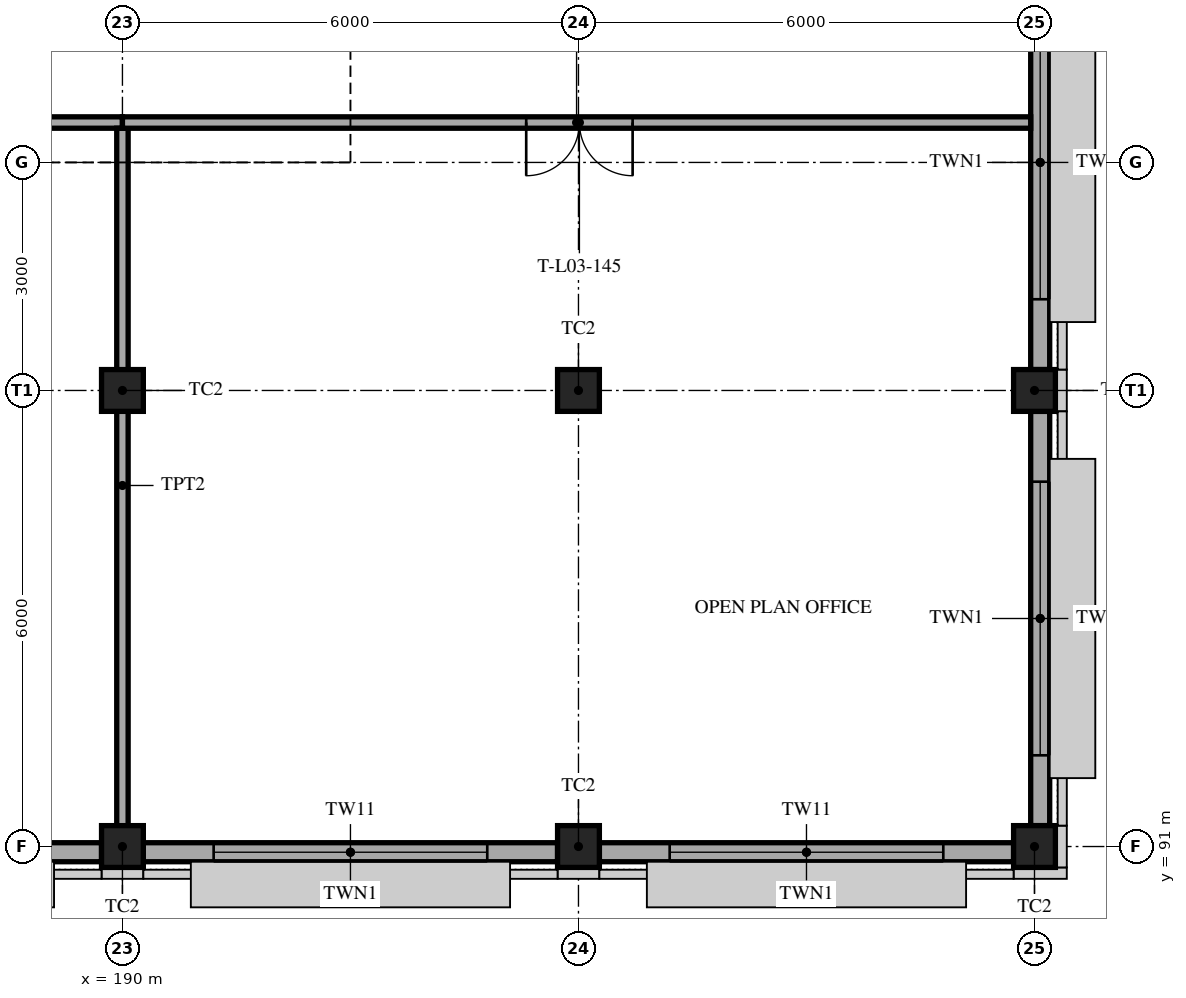
"""IFC4 building model, lengths in metres.
Left out: names, types, materials, properties, quantities, classifications, styles, units other than length and angle.
Written with IfcOpenShell. Run it as: python <this file> out.ifc"""

import sys

from ifc_helpers import new_model, si_unit, direction, frame, frame_2d, origin, origin_2d, place, context, subcontext, project, spatial, polyline, rectangle, hollow_rectangle, outline, extrude, element, fill, save


model = new_model("IFC4")
c1 = context("Model", 3, precision=1e-05, world=origin(), true_north=direction((0.0, 1.0)))
c2 = subcontext(c1, "Body", "Model", "MODEL_VIEW")
j1 = project(units=[si_unit("LENGTHUNIT", "METRE"), si_unit("PLANEANGLEUNIT", "RADIAN")], contexts=[c1])
p1 = place(None, origin())
s1 = spatial("IfcSite", under=j1, at=p1, CompositionType="ELEMENT")
p2 = place(p1, origin())
s2 = spatial("IfcBuilding", under=s1, at=p2, CompositionType="ELEMENT")
p3 = place(p2, frame((0.0, 0.0, 15.0)))
s3 = spatial("IfcBuildingStorey", under=s2, at=p3, CompositionType="ELEMENT", Elevation=15.0)
for number, where, z_axis, x_axis in (
    (1, (190.0, 91.0, 0.0), (0.0, 0.0, 1.0), (1.0, 0.0, 0.0)),
    (2, (196.0, 91.0, 0.0), (0.0, 0.0, 1.0), (1.0, 0.0, 0.0)),
    (3, (202.0, 91.0, 0.0), (0.0, 0.0, 1.0), (1.0, 0.0, 0.0)),
    (4, (202.0, 97.0, 0.0), (0.0, 0.0, 1.0), (1.0, 0.0, 0.0)),
    (5, (190.0, 97.0, 0.0), (0.0, 0.0, 1.0), (1.0, 0.0, 0.0)),
    (6, (196.0, 97.0, 0.0), (0.0, 0.0, 1.0), (1.0, 0.0, 0.0)),
):
    element("IfcColumn", number, at=place(p3, frame(where, z_axis=z_axis, x_axis=x_axis)), inside=s3, PredefinedType="COLUMN", context=c2, shape_type="SweptSolid", body=[
        extrude(hollow_rectangle(XDim=0.55, YDim=0.55, WallThickness=0.032, at=origin_2d()), origin(), (0.0, 0.0, 1.0), 4.2),
    ])
p4 = place(p3, frame((184.275, 90.925, 0.0), z_axis=(0.0, 0.0, 1.0), x_axis=(1.0, 0.0, 0.0)))
e7 = element("IfcWall", 7, at=p4, inside=s3, PredefinedType="SOLIDWALL", context=c2, shape_type="SweptSolid", body=[
    extrude(rectangle(XDim=5.45, YDim=0.25, at=frame_2d((2.725, 0.0))), origin(), (0.0, 0.0, 1.0), 3.55),
])
p5 = place(p4, frame((0.925, 0.0, 0.9)))
e8 = element("IfcOpeningElement", 8, at=p5, cuts=e7, PredefinedType="OPENING", context=c2, shape_type="SweptSolid", body=[
    extrude(rectangle(XDim=3.6, YDim=2.4, at=frame_2d((1.8, 1.2))), frame((0.0, 0.135, 0.0), z_axis=(0.0, -1.0, 0.0), x_axis=(1.0, 0.0, 0.0)), (0.0, 0.0, 1.0), 0.27),
])
p6 = place(p3, frame((190.275, 90.925, 0.0), z_axis=(0.0, 0.0, 1.0), x_axis=(1.0, 0.0, 0.0)))
e9 = element("IfcWall", 9, at=p6, inside=s3, PredefinedType="SOLIDWALL", context=c2, shape_type="SweptSolid", body=[
    extrude(rectangle(XDim=5.45, YDim=0.25, at=frame_2d((2.725, 0.0))), origin(), (0.0, 0.0, 1.0), 3.55),
])
p7 = place(p6, frame((0.925, 0.0, 0.9)))
e10 = element("IfcOpeningElement", 10, at=p7, cuts=e9, PredefinedType="OPENING", context=c2, shape_type="SweptSolid", body=[
    extrude(rectangle(XDim=3.6, YDim=2.4, at=frame_2d((1.8, 1.2))), frame((0.0, 0.135, 0.0), z_axis=(0.0, -1.0, 0.0), x_axis=(1.0, 0.0, 0.0)), (0.0, 0.0, 1.0), 0.27),
])
p8 = place(p3, frame((196.275, 90.925, 0.0), z_axis=(0.0, 0.0, 1.0), x_axis=(1.0, 0.0, 0.0)))
e11 = element("IfcWall", 11, at=p8, inside=s3, PredefinedType="SOLIDWALL", context=c2, shape_type="SweptSolid", body=[
    extrude(rectangle(XDim=5.45, YDim=0.25, at=frame_2d((2.725, 0.0))), origin(), (0.0, 0.0, 1.0), 3.55),
])
p9 = place(p8, frame((0.925, 0.0, 0.9)))
e12 = element("IfcOpeningElement", 12, at=p9, cuts=e11, PredefinedType="OPENING", context=c2, shape_type="SweptSolid", body=[
    extrude(rectangle(XDim=3.6, YDim=2.4, at=frame_2d((1.8, 1.2))), frame((0.0, 0.135, 0.0), z_axis=(0.0, -1.0, 0.0), x_axis=(1.0, 0.0, 0.0)), (0.0, 0.0, 1.0), 0.27),
])
p10 = place(p3, frame((202.075, 91.275, 0.0), z_axis=(0.0, 0.0, 1.0), x_axis=(0.0, 1.0, 0.0)))
e13 = element("IfcWall", 13, at=p10, inside=s3, PredefinedType="SOLIDWALL", context=c2, shape_type="SweptSolid", body=[
    extrude(rectangle(XDim=5.45, YDim=0.25, at=frame_2d((2.725, 0.0))), origin(), (0.0, 0.0, 1.0), 3.55),
])
p11 = place(p10, frame((0.925, 0.0, 0.9)))
e14 = element("IfcOpeningElement", 14, at=p11, cuts=e13, PredefinedType="OPENING", context=c2, shape_type="SweptSolid", body=[
    extrude(rectangle(XDim=3.6, YDim=2.4, at=frame_2d((1.8, 1.2))), frame((0.0, 0.135, 0.0), z_axis=(0.0, -1.0, 0.0), x_axis=(1.0, 0.0, 0.0)), (0.0, 0.0, 1.0), 0.27),
])
p12 = place(p3, frame((202.075, 97.275, 0.0), z_axis=(0.0, 0.0, 1.0), x_axis=(0.0, 1.0, 0.0)))
e15 = element("IfcWall", 15, at=p12, inside=s3, PredefinedType="SOLIDWALL", context=c2, shape_type="SweptSolid", body=[
    extrude(rectangle(XDim=5.45, YDim=0.25, at=frame_2d((2.725, 0.0))), origin(), (0.0, 0.0, 1.0), 3.55),
])
p13 = place(p12, frame((0.925, 0.0, 0.9)))
e16 = element("IfcOpeningElement", 16, at=p13, cuts=e15, PredefinedType="OPENING", context=c2, shape_type="SweptSolid", body=[
    extrude(rectangle(XDim=3.6, YDim=2.4, at=frame_2d((1.8, 1.2))), frame((0.0, 0.135, 0.0), z_axis=(0.0, -1.0, 0.0), x_axis=(1.0, 0.0, 0.0)), (0.0, 0.0, 1.0), 0.27),
])
p14 = place(p3, frame((184.0, 100.525, 0.0), z_axis=(0.0, 0.0, 1.0), x_axis=(1.0, 0.0, 0.0)))
e17 = element("IfcWall", 17, at=p14, inside=s3, PredefinedType="PARTITIONING", context=c2, shape_type="SweptSolid", body=[
    extrude(rectangle(XDim=6.0, YDim=0.15, at=frame_2d((3.0, 0.0))), origin(), (0.0, 0.0, 1.0), 3.4),
])
p15 = place(p14, frame((0.4, 0.0, 0.9)))
e18 = element("IfcOpeningElement", 18, at=p15, cuts=e17, PredefinedType="OPENING", context=c2, shape_type="SweptSolid", body=[
    extrude(rectangle(XDim=1.6, YDim=1.2, at=frame_2d((0.8, 0.6))), frame((0.0, 0.085, 0.0), z_axis=(0.0, -1.0, 0.0), x_axis=(1.0, 0.0, 0.0)), (0.0, 0.0, 1.0), 0.17),
])
p16 = place(p14, frame((2.5, 0.0, 0.0)))
e19 = element("IfcOpeningElement", 19, at=p16, cuts=e17, PredefinedType="OPENING", context=c2, shape_type="SweptSolid", body=[
    extrude(rectangle(XDim=1.0, YDim=2.1, at=frame_2d((0.5, 1.05))), frame((0.0, 0.085, 0.0), z_axis=(0.0, -1.0, 0.0), x_axis=(1.0, 0.0, 0.0)), (0.0, 0.0, 1.0), 0.17),
])
p17 = place(p3, frame((190.0, 91.05, 0.0), z_axis=(0.0, 0.0, 1.0), x_axis=(0.0, 1.0, 0.0)))
e20 = element("IfcWall", 20, at=p17, inside=s3, PredefinedType="PARTITIONING", context=c2, shape_type="SweptSolid", body=[
    extrude(rectangle(XDim=9.4, YDim=0.15, at=frame_2d((4.7, 0.0))), origin(), (0.0, 0.0, 1.0), 3.4),
])
p18 = place(p3, frame((190.0, 100.525, 0.0), z_axis=(0.0, 0.0, 1.0), x_axis=(1.0, 0.0, 0.0)))
e21 = element("IfcWall", 21, at=p18, inside=s3, PredefinedType="PARTITIONING", context=c2, shape_type="SweptSolid", body=[
    extrude(rectangle(XDim=11.95, YDim=0.15, at=frame_2d((5.975, 0.0))), origin(), (0.0, 0.0, 1.0), 3.4),
])
p19 = place(p18, frame((5.312, 0.0, 0.0)))
e22 = element("IfcOpeningElement", 22, at=p19, cuts=e21, PredefinedType="OPENING", context=c2, shape_type="SweptSolid", body=[
    extrude(rectangle(XDim=1.4, YDim=2.1, at=frame_2d((0.7, 1.05))), frame((0.0, 0.085, 0.0), z_axis=(0.0, -1.0, 0.0), x_axis=(1.0, 0.0, 0.0)), (0.0, 0.0, 1.0), 0.17),
])
p20 = place(p7, origin())
e23 = element("IfcWindow", 23, at=p20, inside=s3, PartitioningType="TRIPLE_PANEL_VERTICAL", PredefinedType="WINDOW", context=c2, shape_type="SweptSolid", body=[
    extrude(outline(polyline([(0.0, 0.0), (3.6, 0.0), (3.6, 2.4), (0.0, 2.4), (0.0, 0.0)]), holes=[polyline([(0.06, 0.06), (0.96, 0.06), (0.96, 2.34), (0.06, 2.34), (0.06, 0.06)]), polyline([(1.06, 0.06), (2.54, 0.06), (2.54, 2.34), (1.06, 2.34), (1.06, 0.06)]), polyline([(2.64, 0.06), (3.54, 0.06), (3.54, 2.34), (2.64, 2.34), (2.64, 0.06)])]), frame((0.0, 0.03, 0.0), z_axis=(0.0, -1.0, 0.0), x_axis=(1.0, 0.0, 0.0)), (0.0, 0.0, 1.0), 0.06),
    extrude(rectangle(XDim=0.924, YDim=2.304, at=frame_2d((0.51, 1.2))), frame((0.0, 0.01, 0.0), z_axis=(0.0, -1.0, 0.0), x_axis=(1.0, 0.0, 0.0)), (0.0, 0.0, 1.0), 0.02),
    extrude(rectangle(XDim=1.504, YDim=2.304, at=frame_2d((1.8, 1.2))), frame((0.0, 0.01, 0.0), z_axis=(0.0, -1.0, 0.0), x_axis=(1.0, 0.0, 0.0)), (0.0, 0.0, 1.0), 0.02),
    extrude(rectangle(XDim=0.924, YDim=2.304, at=frame_2d((3.09, 1.2))), frame((0.0, 0.01, 0.0), z_axis=(0.0, -1.0, 0.0), x_axis=(1.0, 0.0, 0.0)), (0.0, 0.0, 1.0), 0.02),
])
fill(e10, e23)
p21 = place(p9, origin())
e24 = element("IfcWindow", 24, at=p21, inside=s3, PartitioningType="TRIPLE_PANEL_VERTICAL", PredefinedType="WINDOW", context=c2, shape_type="SweptSolid", body=[
    extrude(outline(polyline([(0.0, 0.0), (3.6, 0.0), (3.6, 2.4), (0.0, 2.4), (0.0, 0.0)]), holes=[polyline([(0.06, 0.06), (0.96, 0.06), (0.96, 2.34), (0.06, 2.34), (0.06, 0.06)]), polyline([(1.06, 0.06), (2.54, 0.06), (2.54, 2.34), (1.06, 2.34), (1.06, 0.06)]), polyline([(2.64, 0.06), (3.54, 0.06), (3.54, 2.34), (2.64, 2.34), (2.64, 0.06)])]), frame((0.0, 0.03, 0.0), z_axis=(0.0, -1.0, 0.0), x_axis=(1.0, 0.0, 0.0)), (0.0, 0.0, 1.0), 0.06),
    extrude(rectangle(XDim=0.924, YDim=2.304, at=frame_2d((0.51, 1.2))), frame((0.0, 0.01, 0.0), z_axis=(0.0, -1.0, 0.0), x_axis=(1.0, 0.0, 0.0)), (0.0, 0.0, 1.0), 0.02),
    extrude(rectangle(XDim=1.504, YDim=2.304, at=frame_2d((1.8, 1.2))), frame((0.0, 0.01, 0.0), z_axis=(0.0, -1.0, 0.0), x_axis=(1.0, 0.0, 0.0)), (0.0, 0.0, 1.0), 0.02),
    extrude(rectangle(XDim=0.924, YDim=2.304, at=frame_2d((3.09, 1.2))), frame((0.0, 0.01, 0.0), z_axis=(0.0, -1.0, 0.0), x_axis=(1.0, 0.0, 0.0)), (0.0, 0.0, 1.0), 0.02),
])
fill(e12, e24)
p22 = place(p11, origin())
e25 = element("IfcWindow", 25, at=p22, inside=s3, PartitioningType="TRIPLE_PANEL_VERTICAL", PredefinedType="WINDOW", context=c2, shape_type="SweptSolid", body=[
    extrude(outline(polyline([(0.0, 0.0), (3.6, 0.0), (3.6, 2.4), (0.0, 2.4), (0.0, 0.0)]), holes=[polyline([(0.06, 0.06), (0.96, 0.06), (0.96, 2.34), (0.06, 2.34), (0.06, 0.06)]), polyline([(1.06, 0.06), (2.54, 0.06), (2.54, 2.34), (1.06, 2.34), (1.06, 0.06)]), polyline([(2.64, 0.06), (3.54, 0.06), (3.54, 2.34), (2.64, 2.34), (2.64, 0.06)])]), frame((0.0, 0.03, 0.0), z_axis=(0.0, -1.0, 0.0), x_axis=(1.0, 0.0, 0.0)), (0.0, 0.0, 1.0), 0.06),
    extrude(rectangle(XDim=0.924, YDim=2.304, at=frame_2d((0.51, 1.2))), frame((0.0, 0.01, 0.0), z_axis=(0.0, -1.0, 0.0), x_axis=(1.0, 0.0, 0.0)), (0.0, 0.0, 1.0), 0.02),
    extrude(rectangle(XDim=1.504, YDim=2.304, at=frame_2d((1.8, 1.2))), frame((0.0, 0.01, 0.0), z_axis=(0.0, -1.0, 0.0), x_axis=(1.0, 0.0, 0.0)), (0.0, 0.0, 1.0), 0.02),
    extrude(rectangle(XDim=0.924, YDim=2.304, at=frame_2d((3.09, 1.2))), frame((0.0, 0.01, 0.0), z_axis=(0.0, -1.0, 0.0), x_axis=(1.0, 0.0, 0.0)), (0.0, 0.0, 1.0), 0.02),
])
fill(e14, e25)
p23 = place(p13, origin())
e26 = element("IfcWindow", 26, at=p23, inside=s3, PartitioningType="TRIPLE_PANEL_VERTICAL", PredefinedType="WINDOW", context=c2, shape_type="SweptSolid", body=[
    extrude(outline(polyline([(0.0, 0.0), (3.6, 0.0), (3.6, 2.4), (0.0, 2.4), (0.0, 0.0)]), holes=[polyline([(0.06, 0.06), (0.96, 0.06), (0.96, 2.34), (0.06, 2.34), (0.06, 0.06)]), polyline([(1.06, 0.06), (2.54, 0.06), (2.54, 2.34), (1.06, 2.34), (1.06, 0.06)]), polyline([(2.64, 0.06), (3.54, 0.06), (3.54, 2.34), (2.64, 2.34), (2.64, 0.06)])]), frame((0.0, 0.03, 0.0), z_axis=(0.0, -1.0, 0.0), x_axis=(1.0, 0.0, 0.0)), (0.0, 0.0, 1.0), 0.06),
    extrude(rectangle(XDim=0.924, YDim=2.304, at=frame_2d((0.51, 1.2))), frame((0.0, 0.01, 0.0), z_axis=(0.0, -1.0, 0.0), x_axis=(1.0, 0.0, 0.0)), (0.0, 0.0, 1.0), 0.02),
    extrude(rectangle(XDim=1.504, YDim=2.304, at=frame_2d((1.8, 1.2))), frame((0.0, 0.01, 0.0), z_axis=(0.0, -1.0, 0.0), x_axis=(1.0, 0.0, 0.0)), (0.0, 0.0, 1.0), 0.02),
    extrude(rectangle(XDim=0.924, YDim=2.304, at=frame_2d((3.09, 1.2))), frame((0.0, 0.01, 0.0), z_axis=(0.0, -1.0, 0.0), x_axis=(1.0, 0.0, 0.0)), (0.0, 0.0, 1.0), 0.02),
])
fill(e16, e26)
p24 = place(p19, frame((1.4, 0.0, 0.0), z_axis=(0.0, 0.0, 1.0), x_axis=(-1.0, 0.0, 0.0)))
e27 = element("IfcDoor", 27, at=p24, inside=s3, OperationType="DOUBLE_DOOR_SINGLE_SWING", PredefinedType="DOOR", context=c2, shape_type="SweptSolid", body=[
    extrude(rectangle(XDim=1.4, YDim=2.1, at=frame_2d((0.7, 1.05))), frame((0.0, 0.025, 0.0), z_axis=(0.0, -1.0, 0.0), x_axis=(1.0, 0.0, 0.0)), (0.0, 0.0, 1.0), 0.05),
])
fill(e22, e27)
save(model, sys.argv[1])
